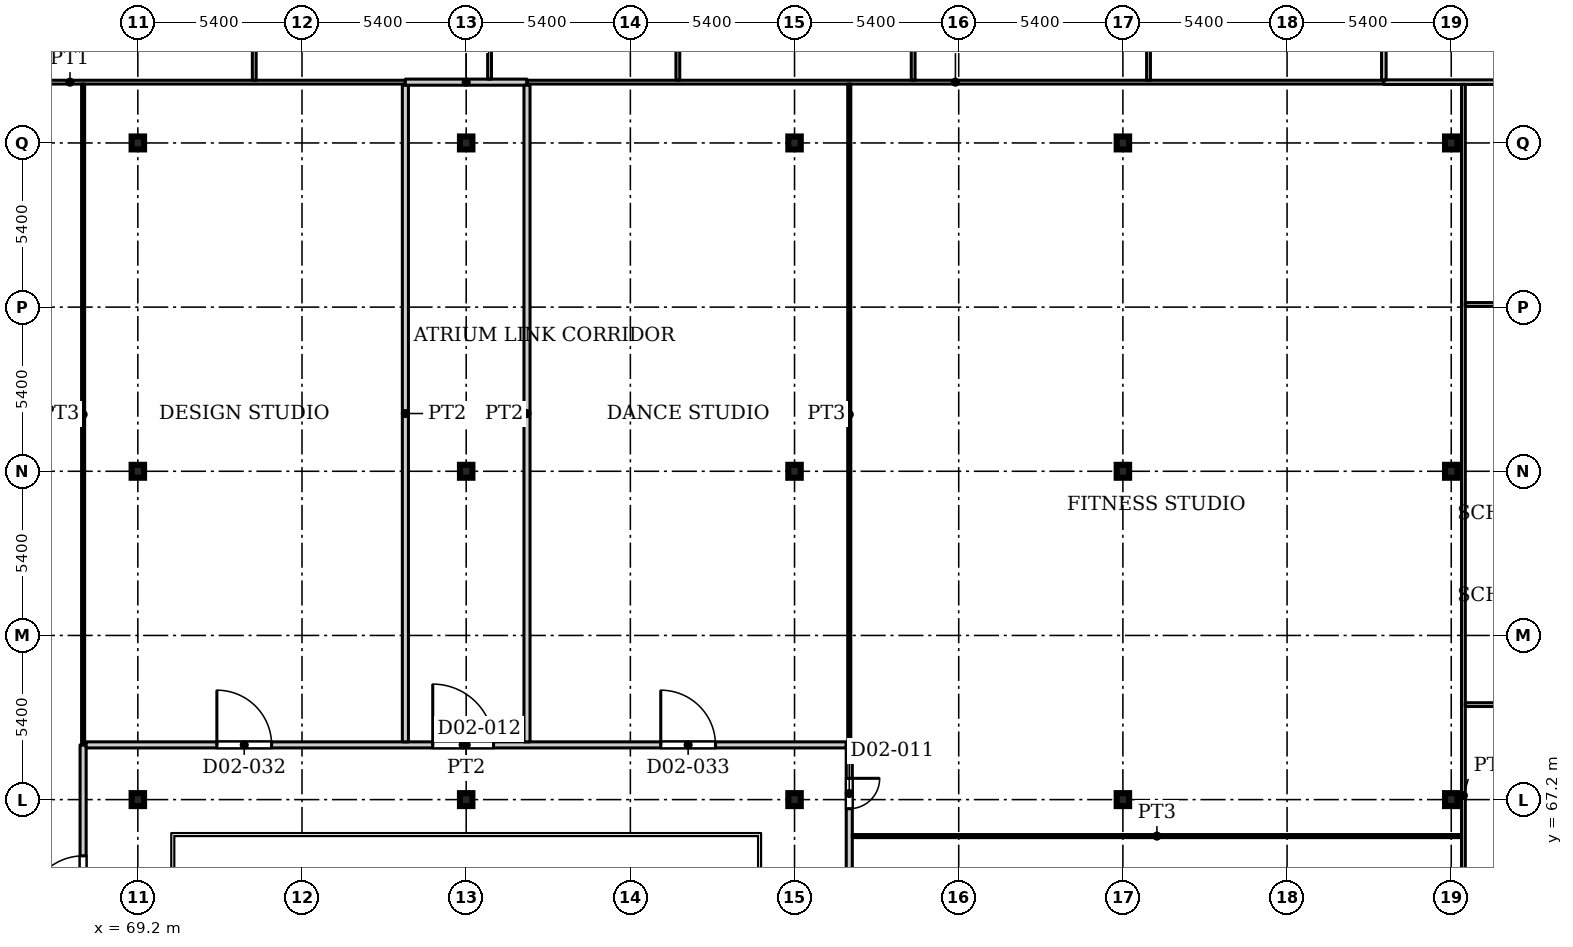
"""IFC4 building model, lengths in metres.
Left out: names, types, materials, properties, quantities, classifications, styles, units other than length and angle.
Written with IfcOpenShell. Run it as: python <this file> out.ifc"""

import sys

from ifc_helpers import new_model, si_unit, direction, frame, frame_2d, origin, origin_2d, place, context, subcontext, project, spatial, rectangle, i_section, extrude, source, transform, mapped, element, fill, save


model = new_model("IFC4")
c1 = context("Model", 3, precision=1e-05, world=origin(), true_north=direction((0.0, 1.0)))
c2 = subcontext(c1, "Body", "Model", "MODEL_VIEW")
j1 = project(units=[si_unit("LENGTHUNIT", "METRE"), si_unit("PLANEANGLEUNIT", "RADIAN")], contexts=[c1])
p1 = place(None, origin())
s1 = spatial("IfcSite", under=j1, at=p1, CompositionType="ELEMENT")
p2 = place(p1, origin())
s2 = spatial("IfcBuilding", under=s1, at=p2, CompositionType="ELEMENT")
p3 = place(p2, frame((0.0, 0.0, 12.5)))
s3 = spatial("IfcBuildingStorey", under=s2, at=p3, CompositionType="ELEMENT", Elevation=12.5)
for number, where, z_axis, x_axis in (
    (1, (69.2, 67.2, 0.0), (0.0, 0.0, 1.0), (1.0, 0.0, 0.0)),
    (2, (80.0, 67.2, 0.0), (0.0, 0.0, 1.0), (1.0, 0.0, 0.0)),
    (3, (90.8, 67.2, 0.0), (0.0, 0.0, 1.0), (1.0, 0.0, 0.0)),
    (4, (101.6, 67.2, 0.0), (0.0, 0.0, 1.0), (1.0, 0.0, 0.0)),
    (5, (112.4, 67.2, 0.0), (0.0, 0.0, 1.0), (1.0, 0.0, 0.0)),
    (6, (69.2, 78.0, 0.0), (0.0, 0.0, 1.0), (1.0, 0.0, 0.0)),
    (7, (80.0, 78.0, 0.0), (0.0, 0.0, 1.0), (1.0, 0.0, 0.0)),
    (8, (90.8, 78.0, 0.0), (0.0, 0.0, 1.0), (1.0, 0.0, 0.0)),
    (9, (101.6, 78.0, 0.0), (0.0, 0.0, 1.0), (1.0, 0.0, 0.0)),
    (10, (112.4, 78.0, 0.0), (0.0, 0.0, 1.0), (1.0, 0.0, 0.0)),
    (11, (69.2, 88.8, 0.0), (0.0, 0.0, 1.0), (1.0, 0.0, 0.0)),
    (12, (80.0, 88.8, 0.0), (0.0, 0.0, 1.0), (1.0, 0.0, 0.0)),
    (13, (90.8, 88.8, 0.0), (0.0, 0.0, 1.0), (1.0, 0.0, 0.0)),
    (14, (101.6, 88.8, 0.0), (0.0, 0.0, 1.0), (1.0, 0.0, 0.0)),
    (15, (112.4, 88.8, 0.0), (0.0, 0.0, 1.0), (1.0, 0.0, 0.0)),
):
    element("IfcColumn", number, at=place(p3, frame(where, z_axis=z_axis, x_axis=x_axis)), inside=s3, PredefinedType="COLUMN", context=c2, shape_type="SweptSolid", body=[
        extrude(i_section(OverallWidth=0.409, OverallDepth=0.425, WebThickness=0.033, FlangeThickness=0.052, FilletRadius=0.013, at=origin_2d()), origin(), (0.0, 0.0, 1.0), 4.5),
    ])
p4 = place(p3, frame((55.938, 90.8, 0.0), z_axis=(0.0, 0.0, 1.0), x_axis=(1.0, 0.0, 0.0)))
e16 = element("IfcWall", 16, at=p4, inside=s3, PredefinedType="PARTITIONING", context=c2, shape_type="SweptSolid", body=[
    extrude(rectangle(XDim=22.062, YDim=0.125, at=frame_2d((11.031, 0.0))), origin(), (0.0, 0.0, 1.0), 4.18),
])
p5 = place(p3, frame((67.4, 43.8, 0.0), z_axis=(0.0, 0.0, 1.0), x_axis=(0.0, 1.0, 0.0)))
e17 = element("IfcWall", 17, at=p5, inside=s3, PredefinedType="PARTITIONING", context=c2, shape_type="SweptSolid", body=[
    extrude(rectangle(XDim=25.2, YDim=0.2, at=frame_2d((12.6, 0.0))), origin(), (0.0, 0.0, 1.0), 4.18),
])
p6 = place(p5, frame((7.25, 0.0, 0.0)))
e18 = element("IfcOpeningElement", 18, at=p6, cuts=e17, PredefinedType="OPENING", context=c2, shape_type="SweptSolid", body=[
    extrude(rectangle(XDim=1.8, YDim=2.1, at=frame_2d((0.9, 1.05))), frame((0.0, 0.11, 0.0), z_axis=(0.0, -1.0, 0.0), x_axis=(1.0, 0.0, 0.0)), (0.0, 0.0, 1.0), 0.22),
])
p7 = place(p5, frame((19.75, 0.0, 0.0)))
e19 = element("IfcOpeningElement", 19, at=p7, cuts=e17, PredefinedType="OPENING", context=c2, shape_type="SweptSolid", body=[
    extrude(rectangle(XDim=1.8, YDim=2.1, at=frame_2d((0.9, 1.05))), frame((0.0, 0.11, 0.0), z_axis=(0.0, -1.0, 0.0), x_axis=(1.0, 0.0, 0.0)), (0.0, 0.0, 1.0), 0.22),
])
p8 = place(p3, frame((67.4, 69.0, 0.0), z_axis=(0.0, 0.0, 1.0), x_axis=(0.0, 1.0, 0.0)))
e20 = element("IfcWall", 20, at=p8, inside=s3, PredefinedType="PARTITIONING", context=c2, shape_type="SweptSolid", body=[
    extrude(rectangle(XDim=21.738, YDim=0.1, at=frame_2d((10.869, 0.0))), origin(), (0.0, 0.0, 1.0), 4.18),
])
p9 = place(p3, frame((67.5, 69.0, 0.0), z_axis=(0.0, 0.0, 1.0), x_axis=(1.0, 0.0, 0.0)))
e21 = element("IfcWall", 21, at=p9, inside=s3, PredefinedType="PARTITIONING", context=c2, shape_type="SweptSolid", body=[
    extrude(rectangle(XDim=25.0, YDim=0.2, at=frame_2d((12.5, 0.0))), origin(), (0.0, 0.0, 1.0), 4.18),
])
p10 = place(p9, frame((11.4, 0.0, 0.0)))
e22 = element("IfcOpeningElement", 22, at=p10, cuts=e21, PredefinedType="OPENING", context=c2, shape_type="SweptSolid", body=[
    extrude(rectangle(XDim=2.0, YDim=2.1, at=frame_2d((1.0, 1.05))), frame((0.0, 0.11, 0.0), z_axis=(0.0, -1.0, 0.0), x_axis=(1.0, 0.0, 0.0)), (0.0, 0.0, 1.0), 0.22),
])
p11 = place(p9, frame((4.3, 0.0, 0.0)))
e23 = element("IfcOpeningElement", 23, at=p11, cuts=e21, PredefinedType="OPENING", context=c2, shape_type="SweptSolid", body=[
    extrude(rectangle(XDim=1.8, YDim=2.1, at=frame_2d((0.9, 1.05))), frame((0.0, 0.11, 0.0), z_axis=(0.0, -1.0, 0.0), x_axis=(1.0, 0.0, 0.0)), (0.0, 0.0, 1.0), 0.22),
])
p12 = place(p9, frame((18.9, 0.0, 0.0)))
e24 = element("IfcOpeningElement", 24, at=p12, cuts=e21, PredefinedType="OPENING", context=c2, shape_type="SweptSolid", body=[
    extrude(rectangle(XDim=1.8, YDim=2.1, at=frame_2d((0.9, 1.05))), frame((0.0, 0.11, 0.0), z_axis=(0.0, -1.0, 0.0), x_axis=(1.0, 0.0, 0.0)), (0.0, 0.0, 1.0), 0.22),
])
p13 = place(p3, frame((73.029, 90.862, 0.0), z_axis=(0.0, 0.0, 1.0), x_axis=(0.0, 1.0, 0.0)))
e25 = element("IfcWall", 25, at=p13, inside=s3, PredefinedType="PARTITIONING", context=c2, shape_type="SweptSolid", body=[
    extrude(rectangle(XDim=8.238, YDim=0.125, at=frame_2d((4.119, 0.0))), origin(), (0.0, 0.0, 1.0), 4.18),
])
p14 = place(p3, frame((78.0, 69.1, 0.0), z_axis=(0.0, 0.0, 1.0), x_axis=(0.0, 1.0, 0.0)))
e26 = element("IfcWall", 26, at=p14, inside=s3, PredefinedType="PARTITIONING", context=c2, shape_type="SweptSolid", body=[
    extrude(rectangle(XDim=21.6, YDim=0.2, at=frame_2d((10.8, 0.0))), origin(), (0.0, 0.0, 1.0), 4.18),
])
p15 = place(p3, frame((78.0, 90.8, 0.0), z_axis=(0.0, 0.0, 1.0), x_axis=(1.0, 0.0, 0.0)))
e27 = element("IfcWall", 27, at=p15, inside=s3, PredefinedType="PARTITIONING", context=c2, shape_type="SweptSolid", body=[
    extrude(rectangle(XDim=4.0, YDim=0.2, at=frame_2d((2.0, 0.0))), origin(), (0.0, 0.0, 1.0), 4.18),
])
p16 = place(p3, frame((80.769, 90.9, 0.0), z_axis=(0.0, 0.0, 1.0), x_axis=(0.0, 1.0, 0.0)))
e28 = element("IfcWall", 28, at=p16, inside=s3, PredefinedType="PARTITIONING", context=c2, shape_type="SweptSolid", body=[
    extrude(rectangle(XDim=8.2, YDim=0.125, at=frame_2d((4.1, 0.0))), origin(), (0.0, 0.0, 1.0), 4.18),
])
p17 = place(p3, frame((82.0, 69.1, 0.0), z_axis=(0.0, 0.0, 1.0), x_axis=(0.0, 1.0, 0.0)))
e29 = element("IfcWall", 29, at=p17, inside=s3, PredefinedType="PARTITIONING", context=c2, shape_type="SweptSolid", body=[
    extrude(rectangle(XDim=21.6, YDim=0.2, at=frame_2d((10.8, 0.0))), origin(), (0.0, 0.0, 1.0), 4.18),
])
p18 = place(p3, frame((82.0, 90.8, 0.0), z_axis=(0.0, 0.0, 1.0), x_axis=(1.0, 0.0, 0.0)))
e30 = element("IfcWall", 30, at=p18, inside=s3, PredefinedType="PARTITIONING", context=c2, shape_type="SweptSolid", body=[
    extrude(rectangle(XDim=28.183, YDim=0.125, at=frame_2d((14.092, 0.0))), origin(), (0.0, 0.0, 1.0), 4.18),
])
p19 = place(p3, frame((86.962, 90.862, 0.0), z_axis=(0.0, 0.0, 1.0), x_axis=(0.0, 1.0, 0.0)))
e31 = element("IfcWall", 31, at=p19, inside=s3, PredefinedType="PARTITIONING", context=c2, shape_type="SweptSolid", body=[
    extrude(rectangle(XDim=8.238, YDim=0.125, at=frame_2d((4.119, 0.0))), origin(), (0.0, 0.0, 1.0), 4.18),
])
p20 = place(p3, frame((92.6, 48.1, 0.0), z_axis=(0.0, 0.0, 1.0), x_axis=(0.0, 1.0, 0.0)))
e32 = element("IfcWall", 32, at=p20, inside=s3, PredefinedType="PARTITIONING", context=c2, shape_type="SweptSolid", body=[
    extrude(rectangle(XDim=20.9, YDim=0.2, at=frame_2d((10.45, 0.0))), origin(), (0.0, 0.0, 1.0), 4.18),
])
p21 = place(p20, frame((8.05, 0.0, 0.0)))
e33 = element("IfcOpeningElement", 33, at=p21, cuts=e32, PredefinedType="OPENING", context=c2, shape_type="SweptSolid", body=[
    extrude(rectangle(XDim=1.8, YDim=2.1, at=frame_2d((0.9, 1.05))), frame((0.0, 0.11, 0.0), z_axis=(0.0, -1.0, 0.0), x_axis=(1.0, 0.0, 0.0)), (0.0, 0.0, 1.0), 0.22),
])
p22 = place(p20, frame((18.8, 0.0, 0.0)))
e34 = element("IfcOpeningElement", 34, at=p22, cuts=e32, PredefinedType="OPENING", context=c2, shape_type="SweptSolid", body=[
    extrude(rectangle(XDim=1.0, YDim=2.1, at=frame_2d((0.5, 1.05))), frame((0.0, 0.11, 0.0), z_axis=(0.0, -1.0, 0.0), x_axis=(1.0, 0.0, 0.0)), (0.0, 0.0, 1.0), 0.22),
])
p23 = place(p3, frame((92.6, 69.0, 0.0), z_axis=(0.0, 0.0, 1.0), x_axis=(0.0, 1.0, 0.0)))
e35 = element("IfcWall", 35, at=p23, inside=s3, PredefinedType="PARTITIONING", context=c2, shape_type="SweptSolid", body=[
    extrude(rectangle(XDim=21.738, YDim=0.1, at=frame_2d((10.869, 0.0))), origin(), (0.0, 0.0, 1.0), 4.18),
])
p24 = place(p3, frame((92.7, 66.0, 0.0), z_axis=(0.0, 0.0, 1.0), x_axis=(1.0, 0.0, 0.0)))
e36 = element("IfcWall", 36, at=p24, inside=s3, PredefinedType="PARTITIONING", context=c2, shape_type="SweptSolid", body=[
    extrude(rectangle(XDim=20.038, YDim=0.1, at=frame_2d((10.019, 0.0))), origin(), (0.0, 0.0, 1.0), 4.18),
])
for number, where, z_axis, x_axis in (
    (37, (94.702, 90.862, 0.0), (0.0, 0.0, 1.0), (0.0, 1.0, 0.0)),
    (38, (102.443, 90.862, 0.0), (0.0, 0.0, 1.0), (0.0, 1.0, 0.0)),
):
    element("IfcWall", number, at=place(p3, frame(where, z_axis=z_axis, x_axis=x_axis)), inside=s3, PredefinedType="PARTITIONING", context=c2, shape_type="SweptSolid", body=[
        extrude(rectangle(XDim=8.238, YDim=0.125, at=frame_2d((4.119, 0.0))), origin(), (0.0, 0.0, 1.0), 4.18),
    ])
p25 = place(p3, frame((110.183, 90.8, 0.0), z_axis=(0.0, 0.0, 1.0), x_axis=(1.0, 0.0, 0.0)))
e39 = element("IfcWall", 39, at=p25, inside=s3, PredefinedType="PARTITIONING", context=c2, shape_type="SweptSolid", body=[
    extrude(rectangle(XDim=10.321, YDim=0.15, at=frame_2d((5.16, 0.0))), origin(), (0.0, 0.0, 1.0), 4.18),
])
p26 = place(p3, frame((110.183, 90.875, 0.0), z_axis=(0.0, 0.0, 1.0), x_axis=(0.0, 1.0, 0.0)))
e40 = element("IfcWall", 40, at=p26, inside=s3, PredefinedType="PARTITIONING", context=c2, shape_type="SweptSolid", body=[
    extrude(rectangle(XDim=8.225, YDim=0.15, at=frame_2d((4.113, 0.0))), origin(), (0.0, 0.0, 1.0), 4.18),
])
p27 = place(p3, frame((112.8, 43.938, 0.0), z_axis=(0.0, 0.0, 1.0), x_axis=(0.0, 1.0, 0.0)))
e41 = element("IfcWall", 41, at=p27, inside=s3, PredefinedType="PARTITIONING", context=c2, shape_type="SweptSolid", body=[
    extrude(rectangle(XDim=46.787, YDim=0.125, at=frame_2d((23.394, 0.0))), origin(), (0.0, 0.0, 1.0), 4.18),
])
p28 = place(p3, frame((112.862, 70.325, 0.0), z_axis=(0.0, 0.0, 1.0), x_axis=(1.0, 0.0, 0.0)))
e42 = element("IfcWall", 42, at=p28, inside=s3, PredefinedType="PARTITIONING", context=c2, shape_type="SweptSolid", body=[
    extrude(rectangle(XDim=5.514, YDim=0.125, at=frame_2d((2.757, 0.0))), origin(), (0.0, 0.0, 1.0), 4.18),
])
p29 = place(p3, frame((112.862, 83.487, 0.0), z_axis=(0.0, 0.0, 1.0), x_axis=(1.0, 0.0, 0.0)))
e43 = element("IfcWall", 43, at=p29, inside=s3, PredefinedType="PARTITIONING", context=c2, shape_type="SweptSolid", body=[
    extrude(rectangle(XDim=8.238, YDim=0.125, at=frame_2d((4.119, 0.0))), origin(), (0.0, 0.0, 1.0), 4.18),
])
m1 = source(origin(), c2, "Body", "SweptSolid", [
    extrude(rectangle(XDim=1.0, YDim=2.1, at=frame_2d((0.5, 1.05))), frame((0.0, 0.025, 0.0), z_axis=(0.0, -1.0, 0.0), x_axis=(1.0, 0.0, 0.0)), (0.0, 0.0, 1.0), 0.05),
])
p30 = place(p22, origin())
e44 = element("IfcDoor", 44, at=p30, inside=s3, OperationType="SINGLE_SWING_RIGHT", PredefinedType="DOOR", context=c2, shape_type="MappedRepresentation", body=[
    mapped(m1, transform((0.0, 0.0, 0.0), x_axis=(1.0, 0.0, 0.0), y_axis=(0.0, 1.0, 0.0), z_axis=(0.0, 0.0, 1.0), scale=1.0)),
])
fill(e34, e44)
m2 = source(origin(), c2, "Body", "SweptSolid", [
    extrude(rectangle(XDim=2.0, YDim=2.1, at=frame_2d((1.0, 1.05))), frame((0.0, 0.025, 0.0), z_axis=(0.0, -1.0, 0.0), x_axis=(1.0, 0.0, 0.0)), (0.0, 0.0, 1.0), 0.05),
])
p31 = place(p10, origin())
e45 = element("IfcDoor", 45, at=p31, inside=s3, OperationType="DOUBLE_DOOR_SINGLE_SWING", PredefinedType="DOOR", context=c2, shape_type="MappedRepresentation", body=[
    mapped(m2, transform((0.0, 0.0, 0.0), x_axis=(1.0, 0.0, 0.0), y_axis=(0.0, 1.0, 0.0), z_axis=(0.0, 0.0, 1.0), scale=1.0)),
])
fill(e22, e45)
m3 = source(origin(), c2, "Body", "SweptSolid", [
    extrude(rectangle(XDim=1.8, YDim=2.1, at=frame_2d((0.9, 1.05))), frame((0.0, 0.025, 0.0), z_axis=(0.0, -1.0, 0.0), x_axis=(1.0, 0.0, 0.0)), (0.0, 0.0, 1.0), 0.05),
])
p32 = place(p11, origin())
e46 = element("IfcDoor", 46, at=p32, inside=s3, OperationType="DOUBLE_DOOR_SINGLE_SWING", PredefinedType="DOOR", context=c2, shape_type="MappedRepresentation", body=[
    mapped(m3, transform((0.0, 0.0, 0.0), x_axis=(1.0, 0.0, 0.0), y_axis=(0.0, 1.0, 0.0), z_axis=(0.0, 0.0, 1.0), scale=1.0)),
])
fill(e23, e46)
p33 = place(p12, origin())
e47 = element("IfcDoor", 47, at=p33, inside=s3, OperationType="DOUBLE_DOOR_SINGLE_SWING", PredefinedType="DOOR", context=c2, shape_type="MappedRepresentation", body=[
    mapped(m3, transform((0.0, 0.0, 0.0), x_axis=(1.0, 0.0, 0.0), y_axis=(0.0, 1.0, 0.0), z_axis=(0.0, 0.0, 1.0), scale=1.0)),
])
fill(e24, e47)
p34 = place(p7, origin())
e48 = element("IfcDoor", 48, at=p34, inside=s3, OperationType="DOUBLE_DOOR_SINGLE_SWING", PredefinedType="DOOR", context=c2, shape_type="MappedRepresentation", body=[
    mapped(m3, transform((0.0, 0.0, 0.0), x_axis=(1.0, 0.0, 0.0), y_axis=(0.0, 1.0, 0.0), z_axis=(0.0, 0.0, 1.0), scale=1.0)),
])
fill(e19, e48)
save(model, sys.argv[1])
